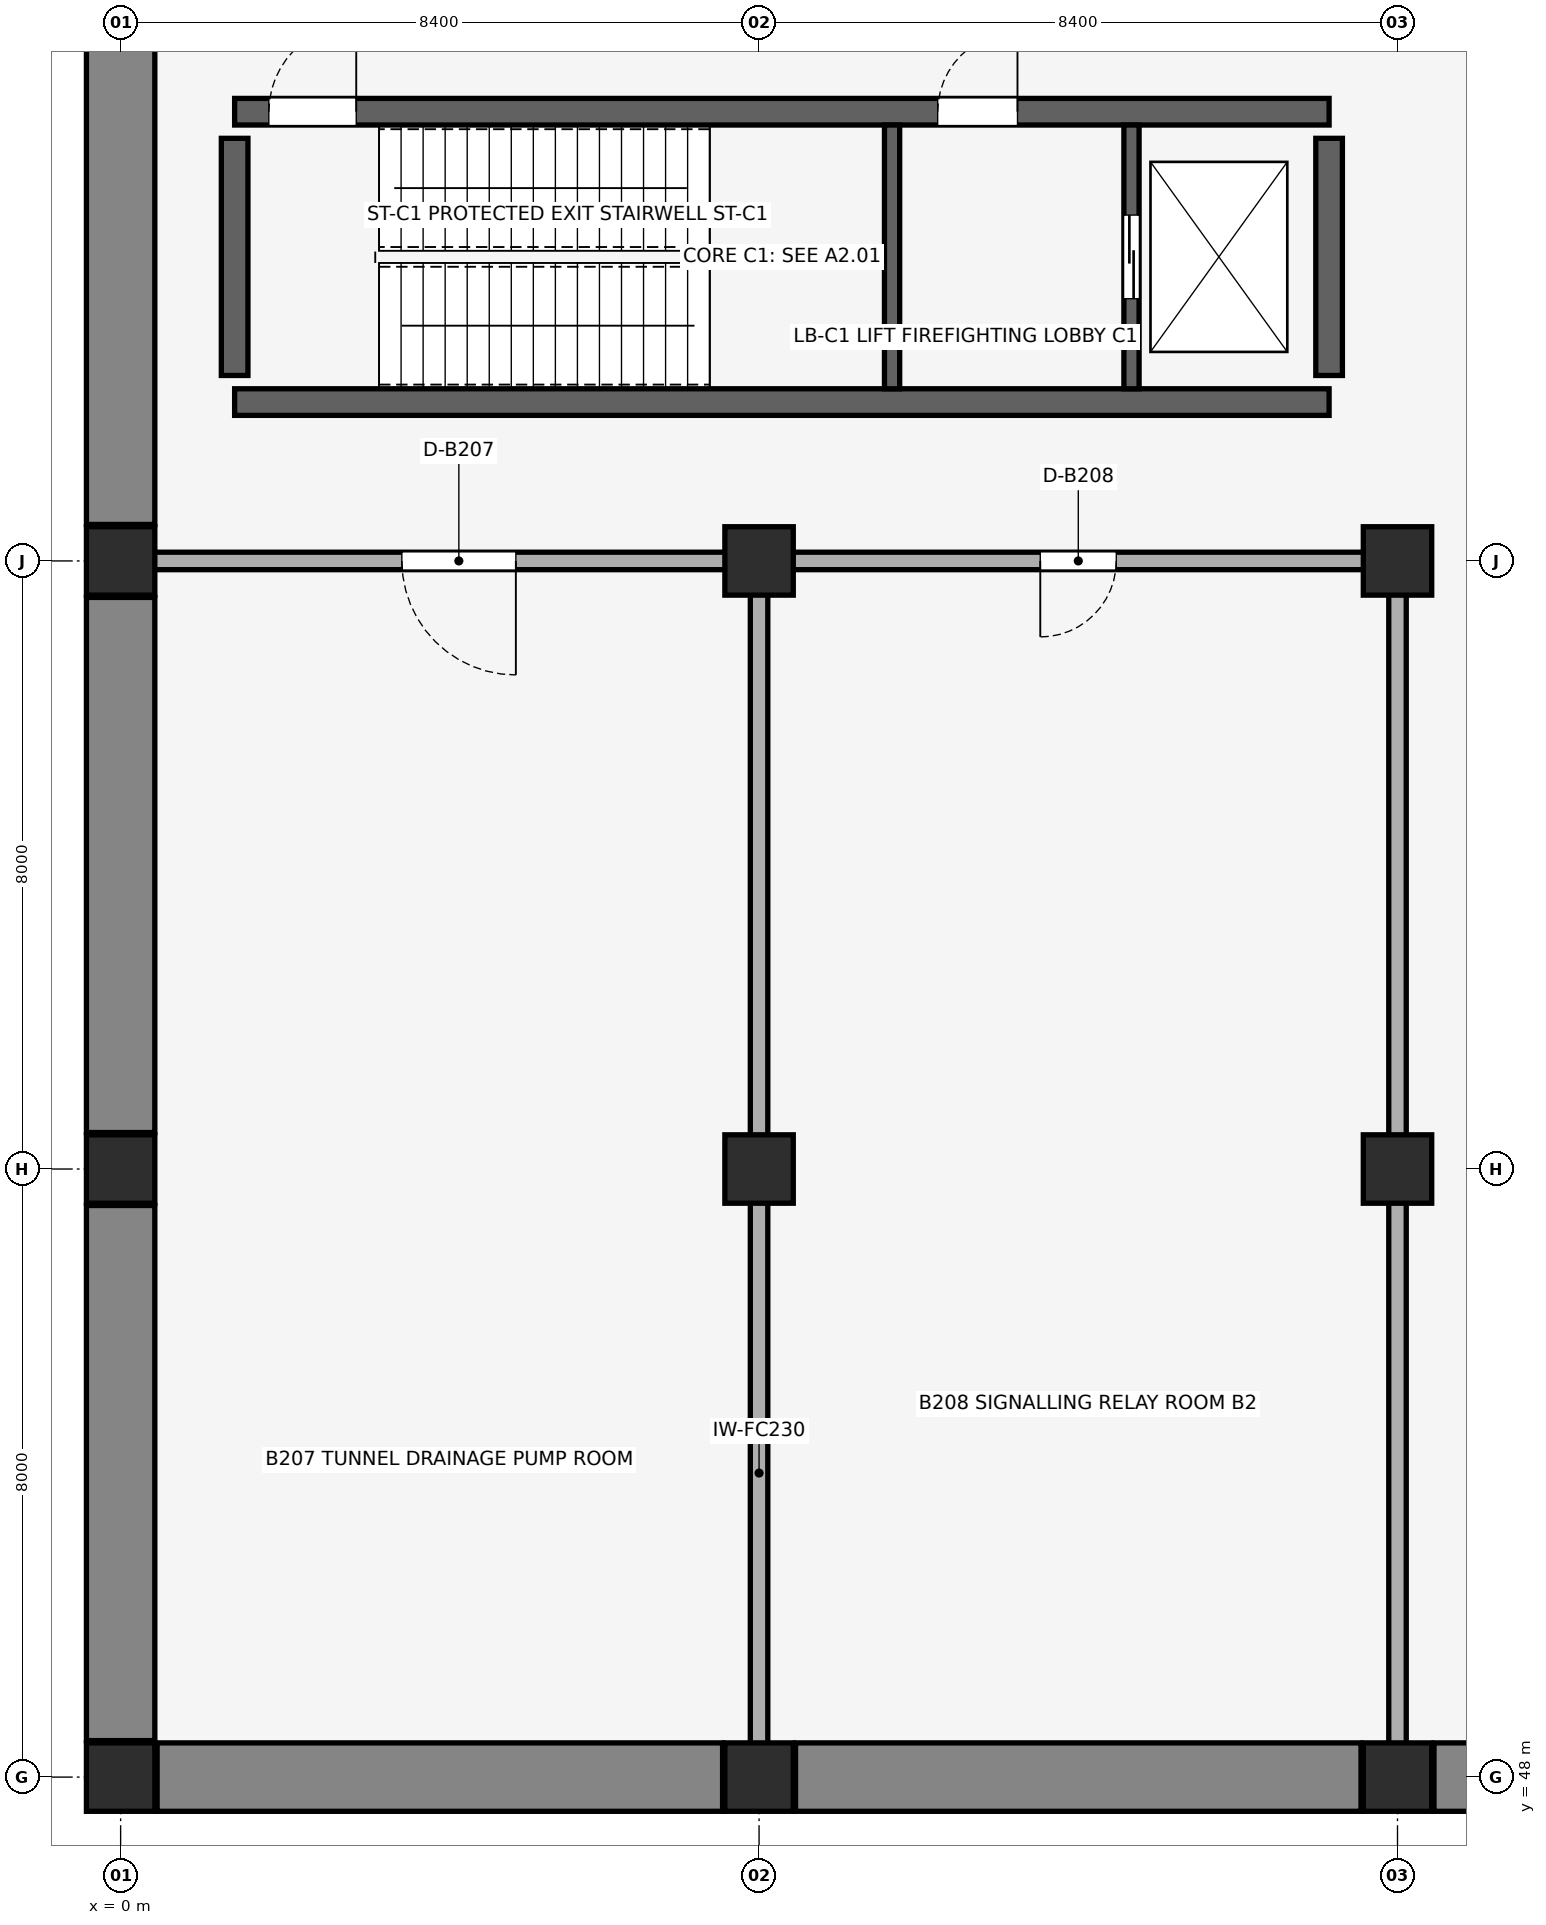
"""IFC4 building model, lengths in metres.
Left out: names, types, materials, properties, quantities, classifications, styles, units other than length and angle.
Written with IfcOpenShell. Run it as: python <this file> out.ifc"""

import sys

from ifc_helpers import new_model, si_unit, direction, frame, frame_2d, origin, origin_2d, place, context, subcontext, project, spatial, rectangle, extrude, element, fill, save


model = new_model("IFC4")
c1 = context("Model", 3, precision=1e-05, world=origin(), true_north=direction((0.0, 1.0)))
c2 = subcontext(c1, "Body", "Model", "MODEL_VIEW")
j1 = project(units=[si_unit("LENGTHUNIT", "METRE"), si_unit("PLANEANGLEUNIT", "RADIAN")], contexts=[c1])
p1 = place(None, origin())
s1 = spatial("IfcSite", under=j1, at=p1, CompositionType="ELEMENT")
p2 = place(p1, origin())
s2 = spatial("IfcBuilding", under=s1, at=p2, CompositionType="ELEMENT")
p3 = place(p2, frame((0.0, 0.0, -10.88)))
s3 = spatial("IfcBuildingStorey", under=s2, at=p3, CompositionType="ELEMENT", Elevation=-10.88)
p4 = place(p3, frame((0.48, 48.0, 0.0), z_axis=(0.0, 0.0, 1.0), x_axis=(1.0, 0.0, 0.0)))
e1 = element("IfcWall", 1, at=p4, inside=s3, PredefinedType="SHEAR", context=c2, shape_type="SweptSolid", body=[
    extrude(rectangle(XDim=7.44, YDim=0.9, at=frame_2d((3.72, 0.0))), origin(), (0.0, 0.0, 1.0), 5.04),
])
p5 = place(p3, frame((8.88, 48.0, 0.0), z_axis=(0.0, 0.0, 1.0), x_axis=(1.0, 0.0, 0.0)))
e2 = element("IfcWall", 2, at=p5, inside=s3, PredefinedType="SHEAR", context=c2, shape_type="SweptSolid", body=[
    extrude(rectangle(XDim=7.44, YDim=0.9, at=frame_2d((3.72, 0.0))), origin(), (0.0, 0.0, 1.0), 5.04),
])
p6 = place(p3, frame((17.28, 48.0, 0.0), z_axis=(0.0, 0.0, 1.0), x_axis=(1.0, 0.0, 0.0)))
e3 = element("IfcWall", 3, at=p6, inside=s3, PredefinedType="SHEAR", context=c2, shape_type="SweptSolid", body=[
    extrude(rectangle(XDim=7.44, YDim=0.9, at=frame_2d((3.72, 0.0))), origin(), (0.0, 0.0, 1.0), 5.04),
])
for number, where, z_axis, x_axis in (
    (4, (0.0, 48.48, 0.0), (0.0, 0.0, 1.0), (0.0, 1.0, 0.0)),
    (5, (0.0, 56.48, 0.0), (0.0, 0.0, 1.0), (0.0, 1.0, 0.0)),
    (6, (0.0, 64.48, 0.0), (0.0, 0.0, 1.0), (0.0, 1.0, 0.0)),
):
    element("IfcWall", number, at=place(p3, frame(where, z_axis=z_axis, x_axis=x_axis)), inside=s3, PredefinedType="SHEAR", context=c2, shape_type="SweptSolid", body=[
        extrude(rectangle(XDim=7.04, YDim=0.9, at=frame_2d((3.52, 0.0))), origin(), (0.0, 0.0, 1.0), 5.04),
    ])
p7 = place(p3, frame((1.5, 66.09, 0.0), z_axis=(0.0, 0.0, 1.0), x_axis=(1.0, 0.0, 0.0)))
e7 = element("IfcWall", 7, at=p7, inside=s3, PredefinedType="SHEAR", context=c2, shape_type="SweptSolid", body=[
    extrude(rectangle(XDim=14.4, YDim=0.35, at=frame_2d((7.2, 0.0))), origin(), (0.0, 0.0, 1.0), 5.04),
])
p8 = place(p3, frame((1.5, 69.91, 0.0), z_axis=(0.0, 0.0, 1.0), x_axis=(1.0, 0.0, 0.0)))
e8 = element("IfcWall", 8, at=p8, inside=s3, PredefinedType="SHEAR", context=c2, shape_type="SweptSolid", body=[
    extrude(rectangle(XDim=14.4, YDim=0.35, at=frame_2d((7.2, 0.0))), origin(), (0.0, 0.0, 1.0), 5.04),
])
p9 = place(p8, frame((0.45, 0.0, 0.0), z_axis=(0.0, 0.0, 1.0), x_axis=(1.0, 0.0, 0.0)))
e9 = element("IfcOpeningElement", 9, at=p9, cuts=e8, PredefinedType="OPENING", context=c2, shape_type="SweptSolid", body=[
    extrude(rectangle(XDim=1.15, YDim=2.15, at=frame_2d((0.575, 1.075))), frame((0.0, 0.185, 0.0), z_axis=(0.0, -1.0, 0.0), x_axis=(1.0, 0.0, 0.0)), (0.0, 0.0, 1.0), 0.37),
])
p10 = place(p8, frame((9.25, 0.0, 0.0), z_axis=(0.0, 0.0, 1.0), x_axis=(1.0, 0.0, 0.0)))
e10 = element("IfcOpeningElement", 10, at=p10, cuts=e8, PredefinedType="OPENING", context=c2, shape_type="SweptSolid", body=[
    extrude(rectangle(XDim=1.05, YDim=2.15, at=frame_2d((0.525, 1.075))), frame((0.0, 0.185, 0.0), z_axis=(0.0, -1.0, 0.0), x_axis=(1.0, 0.0, 0.0)), (0.0, 0.0, 1.0), 0.37),
])
for number, where, z_axis, x_axis in (
    (11, (1.5, 66.44, 0.0), (0.0, 0.0, 1.0), (0.0, 1.0, 0.0)),
    (12, (15.9, 66.44, 0.0), (0.0, 0.0, 1.0), (0.0, 1.0, 0.0)),
):
    element("IfcWall", number, at=place(p3, frame(where, z_axis=z_axis, x_axis=x_axis)), inside=s3, PredefinedType="SHEAR", context=c2, shape_type="SweptSolid", body=[
        extrude(rectangle(XDim=3.12, YDim=0.35, at=frame_2d((1.56, 0.0))), origin(), (0.0, 0.0, 1.0), 5.04),
    ])
for number, where, z_axis, x_axis in (
    (13, (0.0, 48.0, 0.0), (0.0, 0.0, 1.0), (1.0, 0.0, 0.0)),
    (14, (0.0, 56.0, 0.0), (0.0, 0.0, 1.0), (1.0, 0.0, 0.0)),
    (15, (0.0, 64.0, 0.0), (0.0, 0.0, 1.0), (1.0, 0.0, 0.0)),
    (16, (8.4, 48.0, 0.0), (0.0, 0.0, 1.0), (1.0, 0.0, 0.0)),
    (17, (8.4, 56.0, 0.0), (0.0, 0.0, 1.0), (1.0, 0.0, 0.0)),
    (18, (8.4, 64.0, 0.0), (0.0, 0.0, 1.0), (1.0, 0.0, 0.0)),
    (19, (16.8, 48.0, 0.0), (0.0, 0.0, 1.0), (1.0, 0.0, 0.0)),
    (20, (16.8, 56.0, 0.0), (0.0, 0.0, 1.0), (1.0, 0.0, 0.0)),
    (21, (16.8, 64.0, 0.0), (0.0, 0.0, 1.0), (1.0, 0.0, 0.0)),
):
    element("IfcColumn", number, at=place(p3, frame(where, z_axis=z_axis, x_axis=x_axis)), inside=s3, PredefinedType="COLUMN", context=c2, shape_type="SweptSolid", body=[
        extrude(rectangle(XDim=0.9, YDim=0.9, at=origin_2d()), origin(), (0.0, 0.0, 1.0), 5.04),
    ])
p11 = place(p3, frame((10.15, 66.265, 0.0), z_axis=(0.0, 0.0, 1.0), x_axis=(0.0, 1.0, 0.0)))
e22 = element("IfcWall", 22, at=p11, inside=s3, PredefinedType="SHEAR", context=c2, shape_type="SweptSolid", body=[
    extrude(rectangle(XDim=3.47, YDim=0.2, at=frame_2d((1.735, 0.0))), origin(), (0.0, 0.0, 1.0), 5.04),
])
p12 = place(p3, frame((13.3, 66.265, 0.0), z_axis=(0.0, 0.0, 1.0), x_axis=(0.0, 1.0, 0.0)))
e23 = element("IfcWall", 23, at=p12, inside=s3, PredefinedType="SHEAR", context=c2, shape_type="SweptSolid", body=[
    extrude(rectangle(XDim=3.47, YDim=0.2, at=frame_2d((1.735, 0.0))), origin(), (0.0, 0.0, 1.0), 5.04),
])
p13 = place(p12, frame((1.185, 0.0, 0.0), z_axis=(0.0, 0.0, 1.0), x_axis=(1.0, 0.0, 0.0)))
e24 = element("IfcOpeningElement", 24, at=p13, cuts=e23, PredefinedType="OPENING", context=c2, shape_type="SweptSolid", body=[
    extrude(rectangle(XDim=1.1, YDim=2.15, at=frame_2d((0.55, 1.075))), frame((0.0, 0.11, 0.0), z_axis=(0.0, -1.0, 0.0), x_axis=(1.0, 0.0, 0.0)), (0.0, 0.0, 1.0), 0.22),
])
p14 = place(p3, frame((0.44, 64.0, 0.0), z_axis=(0.0, 0.0, 1.0), x_axis=(1.0, 0.0, 0.0)))
e25 = element("IfcWall", 25, at=p14, inside=s3, PredefinedType="PARTITIONING", context=c2, shape_type="SweptSolid", body=[
    extrude(rectangle(XDim=7.52, YDim=0.23, at=frame_2d((3.76, 0.0))), origin(), (0.0, 0.0, 1.0), 3.94),
])
p15 = place(p14, frame((4.76, 0.0, 0.0), z_axis=(0.0, 0.0, 1.0), x_axis=(-1.0, 0.0, 0.0)))
e26 = element("IfcOpeningElement", 26, at=p15, cuts=e25, PredefinedType="OPENING", context=c2, shape_type="SweptSolid", body=[
    extrude(rectangle(XDim=1.5, YDim=2.2, at=frame_2d((0.75, 1.1))), frame((0.0, 0.125, 0.0), z_axis=(0.0, -1.0, 0.0), x_axis=(1.0, 0.0, 0.0)), (0.0, 0.0, 1.0), 0.25),
])
p16 = place(p3, frame((8.84, 64.0, 0.0), z_axis=(0.0, 0.0, 1.0), x_axis=(1.0, 0.0, 0.0)))
e27 = element("IfcWall", 27, at=p16, inside=s3, PredefinedType="PARTITIONING", context=c2, shape_type="SweptSolid", body=[
    extrude(rectangle(XDim=7.52, YDim=0.23, at=frame_2d((3.76, 0.0))), origin(), (0.0, 0.0, 1.0), 4.14),
])
p17 = place(p16, frame((4.26, 0.0, 0.0), z_axis=(0.0, 0.0, 1.0), x_axis=(-1.0, 0.0, 0.0)))
e28 = element("IfcOpeningElement", 28, at=p17, cuts=e27, PredefinedType="OPENING", context=c2, shape_type="SweptSolid", body=[
    extrude(rectangle(XDim=1.0, YDim=2.15, at=frame_2d((0.5, 1.075))), frame((0.0, 0.125, 0.0), z_axis=(0.0, -1.0, 0.0), x_axis=(1.0, 0.0, 0.0)), (0.0, 0.0, 1.0), 0.25),
])
for number, where, z_axis, x_axis in (
    (29, (8.4, 48.44, 0.0), (0.0, 0.0, 1.0), (0.0, 1.0, 0.0)),
    (30, (8.4, 56.44, 0.0), (0.0, 0.0, 1.0), (0.0, 1.0, 0.0)),
    (31, (16.8, 48.44, 0.0), (0.0, 0.0, 1.0), (0.0, 1.0, 0.0)),
    (32, (16.8, 56.44, 0.0), (0.0, 0.0, 1.0), (0.0, 1.0, 0.0)),
):
    element("IfcWall", number, at=place(p3, frame(where, z_axis=z_axis, x_axis=x_axis)), inside=s3, PredefinedType="PARTITIONING", context=c2, shape_type="SweptSolid", body=[
        extrude(rectangle(XDim=7.12, YDim=0.23, at=frame_2d((3.56, 0.0))), origin(), (0.0, 0.0, 1.0), 4.09),
    ])
p18 = place(p9, origin())
e33 = element("IfcDoor", 33, at=p18, inside=s3, OperationType="SINGLE_SWING_RIGHT", PredefinedType="DOOR", context=c2, shape_type="SweptSolid", body=[
    extrude(rectangle(XDim=1.15, YDim=2.15, at=frame_2d((0.575, 1.075))), frame((0.0, 0.025, 0.0), z_axis=(0.0, -1.0, 0.0), x_axis=(1.0, 0.0, 0.0)), (0.0, 0.0, 1.0), 0.05),
])
fill(e9, e33)
p19 = place(p10, origin())
e34 = element("IfcDoor", 34, at=p19, inside=s3, OperationType="SINGLE_SWING_RIGHT", PredefinedType="DOOR", context=c2, shape_type="SweptSolid", body=[
    extrude(rectangle(XDim=1.05, YDim=2.15, at=frame_2d((0.525, 1.075))), frame((0.0, 0.025, 0.0), z_axis=(0.0, -1.0, 0.0), x_axis=(1.0, 0.0, 0.0)), (0.0, 0.0, 1.0), 0.05),
])
fill(e10, e34)
p20 = place(p13, origin())
e35 = element("IfcDoor", 35, at=p20, inside=s3, OperationType="DOUBLE_DOOR_SLIDING", PredefinedType="DOOR", context=c2, shape_type="SweptSolid", body=[
    extrude(rectangle(XDim=1.1, YDim=2.15, at=frame_2d((0.55, 1.075))), frame((0.0, 0.025, 0.0), z_axis=(0.0, -1.0, 0.0), x_axis=(1.0, 0.0, 0.0)), (0.0, 0.0, 1.0), 0.05),
])
fill(e24, e35)
p21 = place(p15, origin())
e36 = element("IfcDoor", 36, at=p21, inside=s3, OperationType="SINGLE_SWING_LEFT", PredefinedType="DOOR", context=c2, shape_type="SweptSolid", body=[
    extrude(rectangle(XDim=1.5, YDim=2.2, at=frame_2d((0.75, 1.1))), frame((0.0, 0.025, 0.0), z_axis=(0.0, -1.0, 0.0), x_axis=(1.0, 0.0, 0.0)), (0.0, 0.0, 1.0), 0.05),
])
fill(e26, e36)
p22 = place(p17, origin())
e37 = element("IfcDoor", 37, at=p22, inside=s3, OperationType="SINGLE_SWING_RIGHT", PredefinedType="DOOR", context=c2, shape_type="SweptSolid", body=[
    extrude(rectangle(XDim=1.0, YDim=2.15, at=frame_2d((0.5, 1.075))), frame((0.0, 0.025, 0.0), z_axis=(0.0, -1.0, 0.0), x_axis=(1.0, 0.0, 0.0)), (0.0, 0.0, 1.0), 0.05),
])
fill(e28, e37)
save(model, sys.argv[1])
